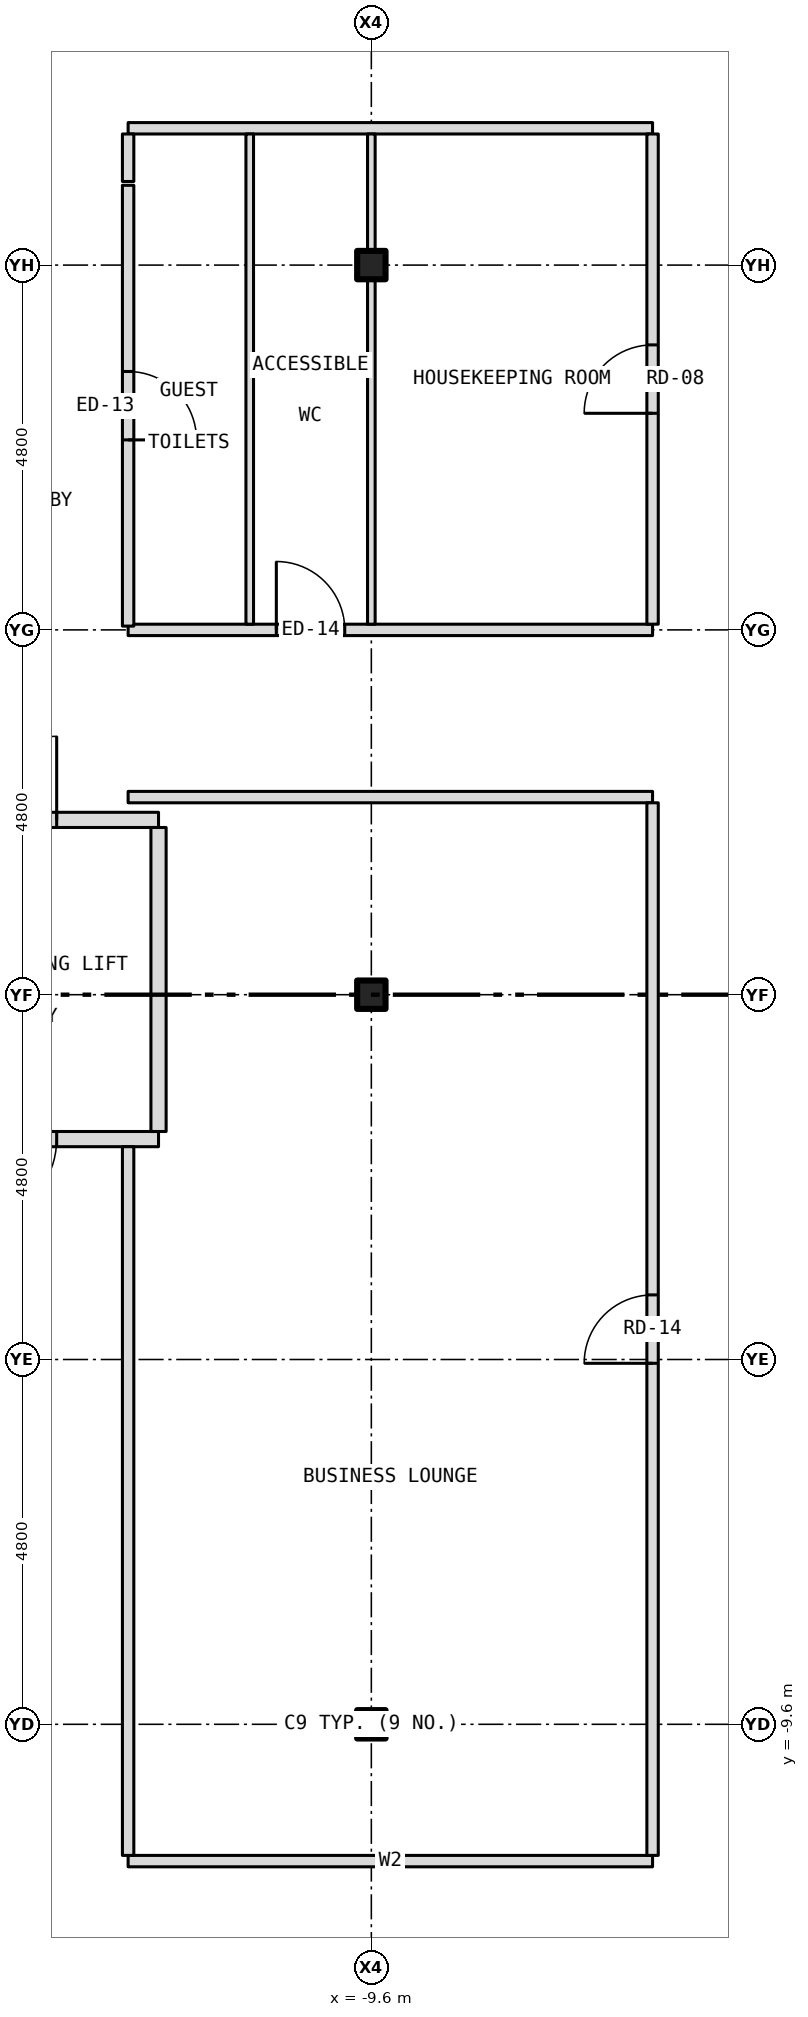
"""IFC4 building model, lengths in metres.
Left out: names, types, materials, properties, quantities, classifications, styles, units other than length and angle.
Written with IfcOpenShell. Run it as: python <this file> out.ifc"""

import sys

from ifc_helpers import new_model, si_unit, direction, frame, frame_2d, origin, origin_2d, place, context, subcontext, project, spatial, rectangle, i_section, extrude, element, fill, save


model = new_model("IFC4")
c1 = context("Model", 3, precision=1e-05, world=origin(), true_north=direction((0.0, 1.0)))
c2 = subcontext(c1, "Body", "Model", "MODEL_VIEW")
j1 = project(units=[si_unit("LENGTHUNIT", "METRE"), si_unit("PLANEANGLEUNIT", "RADIAN")], contexts=[c1])
p1 = place(None, origin())
s1 = spatial("IfcSite", under=j1, at=p1, CompositionType="ELEMENT")
p2 = place(p1, origin())
s2 = spatial("IfcBuilding", under=s1, at=p2, CompositionType="ELEMENT")
p3 = place(p2, frame((0.0, 0.0, 148.0)))
s3 = spatial("IfcBuildingStorey", under=s2, at=p3, CompositionType="ELEMENT", Elevation=148.0)
for number, where, z_axis, x_axis in (
    (1, (-9.6, -9.6, -0.15), (0.0, 0.0, 1.0), (1.0, 0.0, 0.0)),
    (2, (-9.6, 0.0, -0.15), (0.0, 0.0, 1.0), (1.0, 0.0, 0.0)),
    (3, (-9.6, 9.6, -0.15), (0.0, 0.0, 1.0), (1.0, 0.0, 0.0)),
):
    element("IfcColumn", number, at=place(p3, frame(where, z_axis=z_axis, x_axis=x_axis)), inside=s3, PredefinedType="COLUMN", context=c2, shape_type="SweptSolid", body=[
        extrude(i_section(OverallWidth=0.373, OverallDepth=0.373, WebThickness=0.016, FlangeThickness=0.026, at=origin_2d()), origin(), (0.0, 0.0, 1.0), 3.5),
    ])
p4 = place(p3, frame((-12.8, -11.4, 0.0), z_axis=(0.0, 0.0, 1.0), x_axis=(1.0, 0.0, 0.0)))
e4 = element("IfcWall", 4, at=p4, inside=s3, PredefinedType="PARTITIONING", context=c2, shape_type="SweptSolid", body=[
    extrude(rectangle(XDim=6.9, YDim=0.15, at=frame_2d((3.45, 0.0))), origin(), (0.0, 0.0, 1.0), 3.35),
])
p5 = place(p3, frame((-15.68, -1.9, 0.0), z_axis=(0.0, 0.0, 1.0), x_axis=(1.0, 0.0, 0.0)))
e5 = element("IfcWall", 5, at=p5, inside=s3, PredefinedType="PARTITIONING", context=c2, shape_type="SweptSolid", body=[
    extrude(rectangle(XDim=3.28, YDim=0.2, at=frame_2d((1.64, 0.0))), origin(), (0.0, 0.0, 1.0), 3.35),
])
p6 = place(p5, frame((0.84, 0.0, 0.0)))
e6 = element("IfcOpeningElement", 6, at=p6, cuts=e5, PredefinedType="OPENING", context=c2, shape_type="SweptSolid", body=[
    extrude(rectangle(XDim=1.1, YDim=2.1, at=frame_2d((0.55, 1.05))), frame((0.0, 0.112, 0.0), z_axis=(0.0, -1.0, 0.0), x_axis=(1.0, 0.0, 0.0)), (0.0, 0.0, 1.0), 0.224),
])
p7 = place(p3, frame((-15.68, 2.3, 0.0), z_axis=(0.0, 0.0, 1.0), x_axis=(1.0, 0.0, 0.0)))
e7 = element("IfcWall", 7, at=p7, inside=s3, PredefinedType="PARTITIONING", context=c2, shape_type="SweptSolid", body=[
    extrude(rectangle(XDim=3.28, YDim=0.2, at=frame_2d((1.64, 0.0))), origin(), (0.0, 0.0, 1.0), 3.35),
])
p8 = place(p7, frame((0.84, 0.0, 0.0)))
e8 = element("IfcOpeningElement", 8, at=p8, cuts=e7, PredefinedType="OPENING", context=c2, shape_type="SweptSolid", body=[
    extrude(rectangle(XDim=1.1, YDim=2.1, at=frame_2d((0.55, 1.05))), frame((0.0, 0.112, 0.0), z_axis=(0.0, -1.0, 0.0), x_axis=(1.0, 0.0, 0.0)), (0.0, 0.0, 1.0), 0.224),
])
p9 = place(p3, frame((-12.8, 2.6, 0.0), z_axis=(0.0, 0.0, 1.0), x_axis=(1.0, 0.0, 0.0)))
e9 = element("IfcWall", 9, at=p9, inside=s3, PredefinedType="PARTITIONING", context=c2, shape_type="SweptSolid", body=[
    extrude(rectangle(XDim=6.9, YDim=0.15, at=frame_2d((3.45, 0.0))), origin(), (0.0, 0.0, 1.0), 3.35),
])
p10 = place(p3, frame((-12.8, 4.8, 0.0), z_axis=(0.0, 0.0, 1.0), x_axis=(1.0, 0.0, 0.0)))
e10 = element("IfcWall", 10, at=p10, inside=s3, PredefinedType="PARTITIONING", context=c2, shape_type="SweptSolid", body=[
    extrude(rectangle(XDim=6.9, YDim=0.15, at=frame_2d((3.45, 0.0))), origin(), (0.0, 0.0, 1.0), 3.35),
])
p11 = place(p10, frame((1.95, 0.0, 0.0)))
e11 = element("IfcOpeningElement", 11, at=p11, cuts=e10, PredefinedType="OPENING", context=c2, shape_type="SweptSolid", body=[
    extrude(rectangle(XDim=0.9, YDim=2.1, at=frame_2d((0.45, 1.05))), frame((0.0, 0.087, 0.0), z_axis=(0.0, -1.0, 0.0), x_axis=(1.0, 0.0, 0.0)), (0.0, 0.0, 1.0), 0.174),
])
p12 = place(p3, frame((-12.8, 11.4, 0.0), z_axis=(0.0, 0.0, 1.0), x_axis=(1.0, 0.0, 0.0)))
e12 = element("IfcWall", 12, at=p12, inside=s3, PredefinedType="PARTITIONING", context=c2, shape_type="SweptSolid", body=[
    extrude(rectangle(XDim=6.9, YDim=0.15, at=frame_2d((3.45, 0.0))), origin(), (0.0, 0.0, 1.0), 3.35),
])
p13 = place(p3, frame((-12.8, -11.325, 0.0), z_axis=(0.0, 0.0, 1.0), x_axis=(0.0, 1.0, 0.0)))
e13 = element("IfcWall", 13, at=p13, inside=s3, PredefinedType="PARTITIONING", context=c2, shape_type="SweptSolid", body=[
    extrude(rectangle(XDim=9.325, YDim=0.15, at=frame_2d((4.663, 0.0))), origin(), (0.0, 0.0, 1.0), 3.35),
])
p14 = place(p3, frame((-12.8, 4.85, 0.0), z_axis=(0.0, 0.0, 1.0), x_axis=(0.0, 1.0, 0.0)))
e14 = element("IfcWall", 14, at=p14, inside=s3, PredefinedType="PARTITIONING", context=c2, shape_type="SweptSolid", body=[
    extrude(rectangle(XDim=5.8, YDim=0.15, at=frame_2d((2.9, 0.0))), origin(), (0.0, 0.0, 1.0), 3.35),
])
p15 = place(p14, frame((2.45, 0.0, 0.0)))
e15 = element("IfcOpeningElement", 15, at=p15, cuts=e14, PredefinedType="OPENING", context=c2, shape_type="SweptSolid", body=[
    extrude(rectangle(XDim=0.9, YDim=2.1, at=frame_2d((0.45, 1.05))), frame((0.0, 0.087, 0.0), z_axis=(0.0, -1.0, 0.0), x_axis=(1.0, 0.0, 0.0)), (0.0, 0.0, 1.0), 0.174),
])
p16 = place(p3, frame((-12.8, 10.7, 0.0), z_axis=(0.0, 0.0, 1.0), x_axis=(0.0, 1.0, 0.0)))
e16 = element("IfcWall", 16, at=p16, inside=s3, PredefinedType="PARTITIONING", context=c2, shape_type="SweptSolid", body=[
    extrude(rectangle(XDim=0.625, YDim=0.15, at=frame_2d((0.312, 0.0))), origin(), (0.0, 0.0, 1.0), 3.35),
])
p17 = place(p3, frame((-12.4, -1.8, 0.0), z_axis=(0.0, 0.0, 1.0), x_axis=(0.0, 1.0, 0.0)))
e17 = element("IfcWall", 17, at=p17, inside=s3, PredefinedType="PARTITIONING", context=c2, shape_type="SweptSolid", body=[
    extrude(rectangle(XDim=4.0, YDim=0.2, at=frame_2d((2.0, 0.0))), origin(), (0.0, 0.0, 1.0), 3.35),
])
p18 = place(p3, frame((-11.2, 4.875, 0.0), z_axis=(0.0, 0.0, 1.0), x_axis=(0.0, 1.0, 0.0)))
e18 = element("IfcWall", 18, at=p18, inside=s3, PredefinedType="PARTITIONING", context=c2, shape_type="SweptSolid", body=[
    extrude(rectangle(XDim=6.45, YDim=0.1, at=frame_2d((3.225, 0.0))), origin(), (0.0, 0.0, 1.0), 3.35),
])
p19 = place(p3, frame((-9.6, 4.875, 0.0), z_axis=(0.0, 0.0, 1.0), x_axis=(0.0, 1.0, 0.0)))
e19 = element("IfcWall", 19, at=p19, inside=s3, PredefinedType="PARTITIONING", context=c2, shape_type="SweptSolid", body=[
    extrude(rectangle(XDim=4.538, YDim=0.1, at=frame_2d((2.269, 0.0))), origin(), (0.0, 0.0, 1.0), 2.728),
])
p20 = place(p3, frame((-9.6, 9.413, 0.0), z_axis=(0.0, 0.0, 1.0), x_axis=(0.0, 1.0, 0.0)))
e20 = element("IfcWall", 20, at=p20, inside=s3, PredefinedType="PARTITIONING", context=c2, shape_type="SweptSolid", body=[
    extrude(rectangle(XDim=0.374, YDim=0.1, at=frame_2d((0.187, 0.0))), origin(), (0.0, 0.0, 1.0), 3.35),
])
p21 = place(p3, frame((-9.6, 9.787, 0.0), z_axis=(0.0, 0.0, 1.0), x_axis=(0.0, 1.0, 0.0)))
e21 = element("IfcWall", 21, at=p21, inside=s3, PredefinedType="PARTITIONING", context=c2, shape_type="SweptSolid", body=[
    extrude(rectangle(XDim=1.538, YDim=0.1, at=frame_2d((0.769, 0.0))), origin(), (0.0, 0.0, 1.0), 2.728),
])
p22 = place(p3, frame((-5.9, -11.325, 0.0), z_axis=(0.0, 0.0, 1.0), x_axis=(0.0, 1.0, 0.0)))
e22 = element("IfcWall", 22, at=p22, inside=s3, PredefinedType="PARTITIONING", context=c2, shape_type="SweptSolid", body=[
    extrude(rectangle(XDim=13.85, YDim=0.15, at=frame_2d((6.925, 0.0))), origin(), (0.0, 0.0, 1.0), 3.35),
])
p23 = place(p22, frame((6.475, 0.0, 0.0)))
e23 = element("IfcOpeningElement", 23, at=p23, cuts=e22, PredefinedType="OPENING", context=c2, shape_type="SweptSolid", body=[
    extrude(rectangle(XDim=0.9, YDim=2.1, at=frame_2d((0.45, 1.05))), frame((0.0, 0.087, 0.0), z_axis=(0.0, -1.0, 0.0), x_axis=(1.0, 0.0, 0.0)), (0.0, 0.0, 1.0), 0.174),
])
p24 = place(p3, frame((-5.9, 4.875, 0.0), z_axis=(0.0, 0.0, 1.0), x_axis=(0.0, 1.0, 0.0)))
e24 = element("IfcWall", 24, at=p24, inside=s3, PredefinedType="PARTITIONING", context=c2, shape_type="SweptSolid", body=[
    extrude(rectangle(XDim=6.45, YDim=0.15, at=frame_2d((3.225, 0.0))), origin(), (0.0, 0.0, 1.0), 3.35),
])
p25 = place(p24, frame((2.775, 0.0, 0.0)))
e25 = element("IfcOpeningElement", 25, at=p25, cuts=e24, PredefinedType="OPENING", context=c2, shape_type="SweptSolid", body=[
    extrude(rectangle(XDim=0.9, YDim=2.1, at=frame_2d((0.45, 1.05))), frame((0.0, 0.087, 0.0), z_axis=(0.0, -1.0, 0.0), x_axis=(1.0, 0.0, 0.0)), (0.0, 0.0, 1.0), 0.174),
])
p26 = place(p8, origin())
e26 = element("IfcDoor", 26, at=p26, inside=s3, OperationType="SINGLE_SWING_RIGHT", PredefinedType="DOOR", context=c2, shape_type="SweptSolid", body=[
    extrude(rectangle(XDim=1.1, YDim=2.1, at=frame_2d((0.55, 1.05))), frame((0.0, 0.025, 0.0), z_axis=(0.0, -1.0, 0.0), x_axis=(1.0, 0.0, 0.0)), (0.0, 0.0, 1.0), 0.05),
])
fill(e8, e26)
p27 = place(p6, origin())
e27 = element("IfcDoor", 27, at=p27, inside=s3, OperationType="SINGLE_SWING_LEFT", PredefinedType="DOOR", context=c2, shape_type="SweptSolid", body=[
    extrude(rectangle(XDim=1.1, YDim=2.1, at=frame_2d((0.55, 1.05))), frame((0.0, 0.025, 0.0), z_axis=(0.0, -1.0, 0.0), x_axis=(1.0, 0.0, 0.0)), (0.0, 0.0, 1.0), 0.05),
])
fill(e6, e27)
p28 = place(p15, origin())
e28 = element("IfcDoor", 28, at=p28, inside=s3, OperationType="SINGLE_SWING_LEFT", PredefinedType="DOOR", context=c2, shape_type="SweptSolid", body=[
    extrude(rectangle(XDim=0.9, YDim=2.1, at=frame_2d((0.45, 1.05))), frame((0.0, 0.025, 0.0), z_axis=(0.0, -1.0, 0.0), x_axis=(1.0, 0.0, 0.0)), (0.0, 0.0, 1.0), 0.05),
])
fill(e15, e28)
p29 = place(p11, origin())
e29 = element("IfcDoor", 29, at=p29, inside=s3, OperationType="SINGLE_SWING_LEFT", PredefinedType="DOOR", context=c2, shape_type="SweptSolid", body=[
    extrude(rectangle(XDim=0.9, YDim=2.1, at=frame_2d((0.45, 1.05))), frame((0.0, 0.025, 0.0), z_axis=(0.0, -1.0, 0.0), x_axis=(1.0, 0.0, 0.0)), (0.0, 0.0, 1.0), 0.05),
])
fill(e11, e29)
p30 = place(p25, origin())
e30 = element("IfcDoor", 30, at=p30, inside=s3, OperationType="SINGLE_SWING_LEFT", PredefinedType="DOOR", context=c2, shape_type="SweptSolid", body=[
    extrude(rectangle(XDim=0.9, YDim=2.1, at=frame_2d((0.45, 1.05))), frame((0.0, 0.025, 0.0), z_axis=(0.0, -1.0, 0.0), x_axis=(1.0, 0.0, 0.0)), (0.0, 0.0, 1.0), 0.05),
])
fill(e25, e30)
p31 = place(p23, origin())
e31 = element("IfcDoor", 31, at=p31, inside=s3, OperationType="SINGLE_SWING_LEFT", PredefinedType="DOOR", context=c2, shape_type="SweptSolid", body=[
    extrude(rectangle(XDim=0.9, YDim=2.1, at=frame_2d((0.45, 1.05))), frame((0.0, 0.025, 0.0), z_axis=(0.0, -1.0, 0.0), x_axis=(1.0, 0.0, 0.0)), (0.0, 0.0, 1.0), 0.05),
])
fill(e23, e31)
save(model, sys.argv[1])
